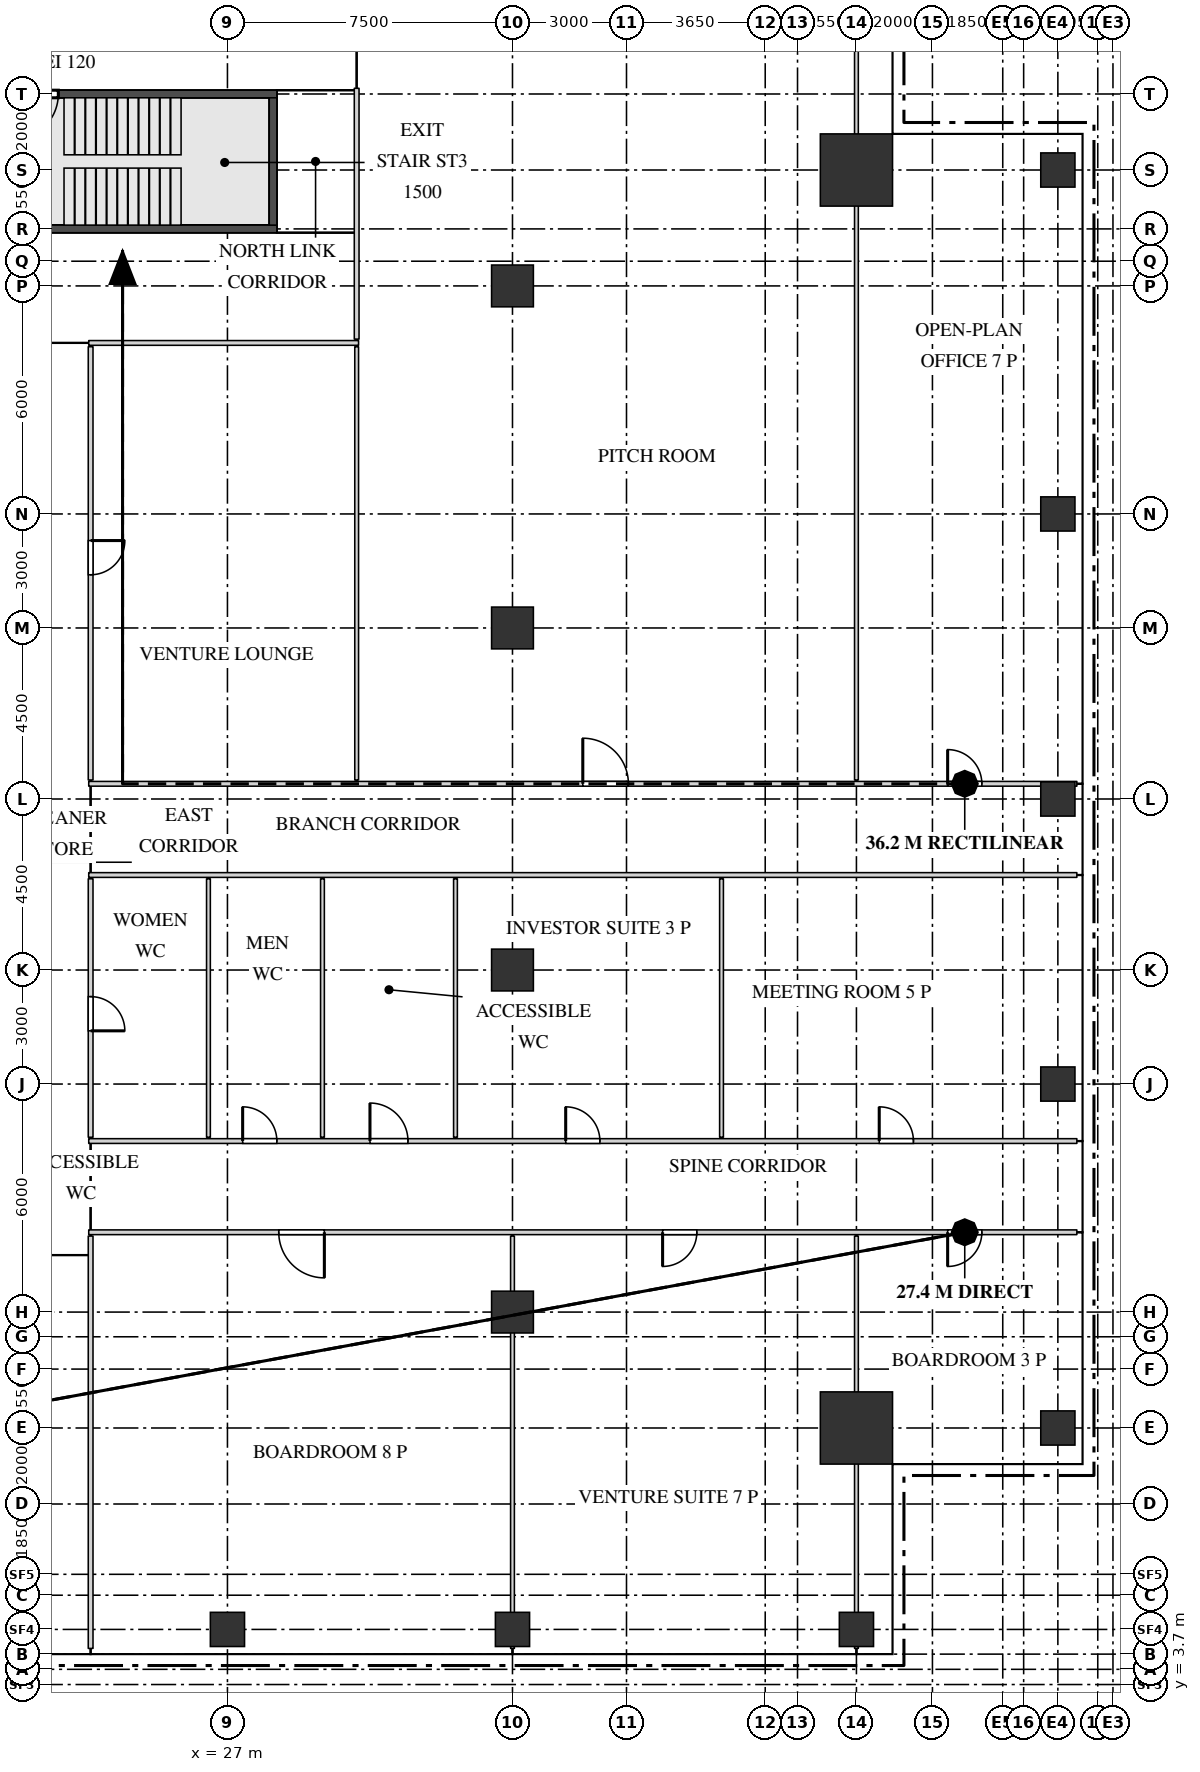
"""IFC4 building model, lengths in metres.
Left out: names, types, materials, properties, quantities, classifications, styles, units other than length and angle.
Written with IfcOpenShell. Run it as: python <this file> out.ifc"""

import sys

from ifc_helpers import new_model, si_unit, direction, frame, frame_2d, origin, origin_2d, place, context, subcontext, project, spatial, rectangle, extrude, source, transform, mapped, element, fill, save


model = new_model("IFC4")
c1 = context("Model", 3, precision=1e-05, world=origin(), true_north=direction((0.0, 1.0)))
c2 = subcontext(c1, "Body", "Model", "MODEL_VIEW")
j1 = project(units=[si_unit("LENGTHUNIT", "METRE"), si_unit("PLANEANGLEUNIT", "RADIAN")], contexts=[c1])
p1 = place(None, origin())
s1 = spatial("IfcSite", under=j1, at=p1, CompositionType="ELEMENT")
p2 = place(p1, origin())
s2 = spatial("IfcBuilding", under=s1, at=p2, CompositionType="ELEMENT")
p3 = place(p2, frame((0.0, 0.0, 234.2)))
s3 = spatial("IfcBuildingStorey", under=s2, at=p3, CompositionType="ELEMENT", Elevation=234.2)
m1 = source(origin(), c2, "Body", "SweptSolid", [
    extrude(rectangle(XDim=7.1, YDim=0.2, at=frame_2d((3.55, 0.0))), origin(), (0.0, 0.0, 1.0), 3.75),
])
p4 = place(p3, frame((21.2, 45.55, 0.0), z_axis=(0.0, 0.0, 1.0), x_axis=(1.0, 0.0, 0.0)))
e1 = element("IfcWall", 1, at=p4, inside=s3, PredefinedType="SHEAR", context=c2, shape_type="MappedRepresentation", body=[
    mapped(m1, transform((0.0, 0.0, 0.0))),
])
m2 = source(origin(), c2, "Body", "SweptSolid", [
    extrude(rectangle(XDim=1.2, YDim=2.1, at=frame_2d((0.6, 1.05))), frame((0.0, 0.11, 0.0), z_axis=(0.0, -1.0, 0.0), x_axis=(1.0, 0.0, 0.0)), (0.0, 0.0, 1.0), 0.22),
])
p5 = place(p4, frame((0.15, 0.0, 0.0)))
e2 = element("IfcOpeningElement", 2, at=p5, cuts=e1, PredefinedType="OPENING", context=c2, shape_type="MappedRepresentation", body=[
    mapped(m2, transform((0.0, 0.0, 0.0))),
])
p6 = place(p3, frame((21.2, 42.0, 0.0), z_axis=(0.0, 0.0, 1.0), x_axis=(1.0, 0.0, 0.0)))
e3 = element("IfcWall", 3, at=p6, inside=s3, PredefinedType="SHEAR", context=c2, shape_type="MappedRepresentation", body=[
    mapped(m1, transform((0.0, 0.0, 0.0))),
])
m3 = source(origin(), c2, "Body", "SweptSolid", [
    extrude(rectangle(XDim=3.35, YDim=0.2, at=frame_2d((1.675, 0.0))), origin(), (0.0, 0.0, 1.0), 3.75),
])
p7 = place(p3, frame((28.2, 42.1, 0.0), z_axis=(0.0, 0.0, 1.0), x_axis=(0.0, 1.0, 0.0)))
e4 = element("IfcWall", 4, at=p7, inside=s3, PredefinedType="SHEAR", context=c2, shape_type="MappedRepresentation", body=[
    mapped(m3, transform((0.0, 0.0, 0.0))),
])
m4 = source(origin(), c2, "Body", "SweptSolid", [
    extrude(rectangle(XDim=1.9, YDim=1.9, at=origin_2d()), origin(), (0.0, 0.0, 1.0), 4.0),
])
for number, where, z_axis, x_axis in (
    (5, (43.55, 43.55, 0.0), (0.0, 0.0, 1.0), (1.0, 0.0, 0.0)),
    (6, (43.55, 10.45, 0.0), (0.0, 0.0, 1.0), (1.0, 0.0, 0.0)),
):
    element("IfcColumn", number, at=place(p3, frame(where, z_axis=z_axis, x_axis=x_axis)), inside=s3, PredefinedType="COLUMN", context=c2, shape_type="MappedRepresentation", body=[
        mapped(m4, transform((0.0, 0.0, 0.0))),
    ])
m5 = source(origin(), c2, "Body", "SweptSolid", [
    extrude(rectangle(XDim=0.9, YDim=0.9, at=origin_2d()), origin(), (0.0, 0.0, 1.0), 3.75),
])
for number, where, z_axis, x_axis in (
    (7, (27.0, 5.15, 0.0), (0.0, 0.0, 1.0), (1.0, 0.0, 0.0)),
    (8, (34.5, 5.15, 0.0), (0.0, 0.0, 1.0), (1.0, 0.0, 0.0)),
    (9, (43.55, 5.15, 0.0), (0.0, 0.0, 1.0), (1.0, 0.0, 0.0)),
    (10, (48.85, 10.45, 0.0), (0.0, 0.0, 1.0), (1.0, 0.0, 0.0)),
    (11, (48.85, 19.5, 0.0), (0.0, 0.0, 1.0), (1.0, 0.0, 0.0)),
    (12, (48.85, 27.0, 0.0), (0.0, 0.0, 1.0), (1.0, 0.0, 0.0)),
    (13, (48.85, 34.5, 0.0), (0.0, 0.0, 1.0), (1.0, 0.0, 0.0)),
    (14, (48.85, 43.55, 0.0), (0.0, 0.0, 1.0), (1.0, 0.0, 0.0)),
):
    element("IfcColumn", number, at=place(p3, frame(where, z_axis=z_axis, x_axis=x_axis)), inside=s3, PredefinedType="COLUMN", context=c2, shape_type="MappedRepresentation", body=[
        mapped(m5, transform((0.0, 0.0, 0.0))),
    ])
m6 = source(origin(), c2, "Body", "SweptSolid", [
    extrude(rectangle(XDim=1.1, YDim=1.1, at=origin_2d()), origin(), (0.0, 0.0, 1.0), 3.75),
])
for number, where, z_axis, x_axis in (
    (15, (34.5, 13.5, 0.0), (0.0, 0.0, 1.0), (1.0, 0.0, 0.0)),
    (16, (34.5, 22.5, 0.0), (0.0, 0.0, 1.0), (1.0, 0.0, 0.0)),
    (17, (34.5, 31.5, 0.0), (0.0, 0.0, 1.0), (1.0, 0.0, 0.0)),
    (18, (34.5, 40.5, 0.0), (0.0, 0.0, 1.0), (1.0, 0.0, 0.0)),
):
    element("IfcColumn", number, at=place(p3, frame(where, z_axis=z_axis, x_axis=x_axis)), inside=s3, PredefinedType="COLUMN", context=c2, shape_type="MappedRepresentation", body=[
        mapped(m6, transform((0.0, 0.0, 0.0))),
    ])
m7 = source(origin(), c2, "Body", "SweptSolid", [
    extrude(rectangle(XDim=10.85, YDim=0.125, at=frame_2d((5.425, 0.0))), origin(), (0.0, 0.0, 1.0), 3.8),
])
p8 = place(p3, frame((23.4, 4.65, 0.0), z_axis=(0.0, 0.0, 1.0), x_axis=(0.0, 1.0, 0.0)))
e19 = element("IfcWall", 19, at=p8, inside=s3, PredefinedType="PARTITIONING", context=c2, shape_type="MappedRepresentation", body=[
    mapped(m7, transform((0.0, 0.0, 0.0))),
])
m8 = source(origin(), c2, "Body", "SweptSolid", [
    extrude(rectangle(XDim=10.85, YDim=0.1, at=frame_2d((5.425, 0.0))), origin(), (0.0, 0.0, 1.0), 3.35),
])
p9 = place(p3, frame((34.5, 4.65, 0.0), z_axis=(0.0, 0.0, 1.0), x_axis=(0.0, 1.0, 0.0)))
e20 = element("IfcWall", 20, at=p9, inside=s3, PredefinedType="PARTITIONING", context=c2, shape_type="MappedRepresentation", body=[
    mapped(m8, transform((0.0, 0.0, 0.0))),
])
m9 = source(origin(), c2, "Body", "SweptSolid", [
    extrude(rectangle(XDim=10.85, YDim=0.1, at=frame_2d((5.425, 0.0))), origin(), (0.0, 0.0, 1.0), 3.3),
])
p10 = place(p3, frame((43.55, 4.65, 0.0), z_axis=(0.0, 0.0, 1.0), x_axis=(0.0, 1.0, 0.0)))
e21 = element("IfcWall", 21, at=p10, inside=s3, PredefinedType="PARTITIONING", context=c2, shape_type="MappedRepresentation", body=[
    mapped(m9, transform((0.0, 0.0, 0.0))),
])
m10 = source(origin(), c2, "Body", "SweptSolid", [
    extrude(rectangle(XDim=26.0, YDim=0.125, at=frame_2d((13.0, 0.0))), origin(), (0.0, 0.0, 1.0), 3.8),
])
p11 = place(p3, frame((23.35, 15.6, 0.0), z_axis=(0.0, 0.0, 1.0), x_axis=(1.0, 0.0, 0.0)))
e22 = element("IfcWall", 22, at=p11, inside=s3, PredefinedType="PARTITIONING", context=c2, shape_type="MappedRepresentation", body=[
    mapped(m10, transform((0.0, 0.0, 0.0))),
])
m11 = source(origin(), c2, "Body", "SweptSolid", [
    extrude(rectangle(XDim=1.2, YDim=2.1, at=frame_2d((0.6, 1.05))), frame((0.0, 0.073, 0.0), z_axis=(0.0, -1.0, 0.0), x_axis=(1.0, 0.0, 0.0)), (0.0, 0.0, 1.0), 0.145),
])
p12 = place(p11, frame((5.0, 0.0, 0.0)))
e23 = element("IfcOpeningElement", 23, at=p12, cuts=e22, PredefinedType="OPENING", context=c2, shape_type="MappedRepresentation", body=[
    mapped(m11, transform((0.0, 0.0, 0.0))),
])
m12 = source(origin(), c2, "Body", "SweptSolid", [
    extrude(rectangle(XDim=0.9, YDim=2.1, at=frame_2d((0.45, 1.05))), frame((0.0, 0.073, 0.0), z_axis=(0.0, -1.0, 0.0), x_axis=(1.0, 0.0, 0.0)), (0.0, 0.0, 1.0), 0.145),
])
p13 = place(p11, frame((15.1, 0.0, 0.0)))
e24 = element("IfcOpeningElement", 24, at=p13, cuts=e22, PredefinedType="OPENING", context=c2, shape_type="MappedRepresentation", body=[
    mapped(m12, transform((0.0, 0.0, 0.0))),
])
p14 = place(p11, frame((22.6, 0.0, 0.0)))
e25 = element("IfcOpeningElement", 25, at=p14, cuts=e22, PredefinedType="OPENING", context=c2, shape_type="MappedRepresentation", body=[
    mapped(m12, transform((0.0, 0.0, 0.0))),
])
p15 = place(p3, frame((23.35, 18.0, 0.0), z_axis=(0.0, 0.0, 1.0), x_axis=(1.0, 0.0, 0.0)))
e26 = element("IfcWall", 26, at=p15, inside=s3, PredefinedType="PARTITIONING", context=c2, shape_type="MappedRepresentation", body=[
    mapped(m10, transform((0.0, 0.0, 0.0))),
])
p16 = place(p15, frame((4.05, 0.0, 0.0)))
e27 = element("IfcOpeningElement", 27, at=p16, cuts=e26, PredefinedType="OPENING", context=c2, shape_type="MappedRepresentation", body=[
    mapped(m12, transform((0.0, 0.0, 0.0))),
])
m13 = source(origin(), c2, "Body", "SweptSolid", [
    extrude(rectangle(XDim=1.0, YDim=2.1, at=frame_2d((0.5, 1.05))), frame((0.0, 0.073, 0.0), z_axis=(0.0, -1.0, 0.0), x_axis=(1.0, 0.0, 0.0)), (0.0, 0.0, 1.0), 0.145),
])
p17 = place(p15, frame((7.4, 0.0, 0.0)))
e28 = element("IfcOpeningElement", 28, at=p17, cuts=e26, PredefinedType="OPENING", context=c2, shape_type="MappedRepresentation", body=[
    mapped(m13, transform((0.0, 0.0, 0.0))),
])
p18 = place(p15, frame((12.55, 0.0, 0.0)))
e29 = element("IfcOpeningElement", 29, at=p18, cuts=e26, PredefinedType="OPENING", context=c2, shape_type="MappedRepresentation", body=[
    mapped(m12, transform((0.0, 0.0, 0.0))),
])
p19 = place(p15, frame((20.8, 0.0, 0.0)))
e30 = element("IfcOpeningElement", 30, at=p19, cuts=e26, PredefinedType="OPENING", context=c2, shape_type="MappedRepresentation", body=[
    mapped(m12, transform((0.0, 0.0, 0.0))),
])
m14 = source(origin(), c2, "Body", "SweptSolid", [
    extrude(rectangle(XDim=6.8, YDim=0.125, at=frame_2d((3.4, 0.0))), origin(), (0.0, 0.0, 1.0), 3.8),
])
p20 = place(p3, frame((23.4, 18.1, 0.0), z_axis=(0.0, 0.0, 1.0), x_axis=(0.0, 1.0, 0.0)))
e31 = element("IfcWall", 31, at=p20, inside=s3, PredefinedType="PARTITIONING", context=c2, shape_type="MappedRepresentation", body=[
    mapped(m14, transform((0.0, 0.0, 0.0))),
])
p21 = place(p20, frame((2.8, 0.0, 0.0)))
e32 = element("IfcOpeningElement", 32, at=p21, cuts=e31, PredefinedType="OPENING", context=c2, shape_type="MappedRepresentation", body=[
    mapped(m12, transform((0.0, 0.0, 0.0))),
])
m15 = source(origin(), c2, "Body", "SweptSolid", [
    extrude(rectangle(XDim=6.8, YDim=0.1, at=frame_2d((3.4, 0.0))), origin(), (0.0, 0.0, 1.0), 3.8),
])
for number, where, z_axis, x_axis in (
    (33, (26.5, 18.1, 0.0), (0.0, 0.0, 1.0), (0.0, 1.0, 0.0)),
    (34, (29.5, 18.1, 0.0), (0.0, 0.0, 1.0), (0.0, 1.0, 0.0)),
    (35, (33.0, 18.1, 0.0), (0.0, 0.0, 1.0), (0.0, 1.0, 0.0)),
    (36, (40.0, 18.1, 0.0), (0.0, 0.0, 1.0), (0.0, 1.0, 0.0)),
):
    element("IfcWall", number, at=place(p3, frame(where, z_axis=z_axis, x_axis=x_axis)), inside=s3, PredefinedType="PARTITIONING", context=c2, shape_type="MappedRepresentation", body=[
        mapped(m15, transform((0.0, 0.0, 0.0))),
    ])
p22 = place(p3, frame((23.35, 25.0, 0.0), z_axis=(0.0, 0.0, 1.0), x_axis=(1.0, 0.0, 0.0)))
e37 = element("IfcWall", 37, at=p22, inside=s3, PredefinedType="PARTITIONING", context=c2, shape_type="MappedRepresentation", body=[
    mapped(m10, transform((0.0, 0.0, 0.0))),
])
p23 = place(p3, frame((23.35, 27.4, 0.0), z_axis=(0.0, 0.0, 1.0), x_axis=(1.0, 0.0, 0.0)))
e38 = element("IfcWall", 38, at=p23, inside=s3, PredefinedType="PARTITIONING", context=c2, shape_type="MappedRepresentation", body=[
    mapped(m10, transform((0.0, 0.0, 0.0))),
])
p24 = place(p23, frame((13.0, 0.0, 0.0)))
e39 = element("IfcOpeningElement", 39, at=p24, cuts=e38, PredefinedType="OPENING", context=c2, shape_type="MappedRepresentation", body=[
    mapped(m11, transform((0.0, 0.0, 0.0))),
])
p25 = place(p23, frame((22.6, 0.0, 0.0)))
e40 = element("IfcOpeningElement", 40, at=p25, cuts=e38, PredefinedType="OPENING", context=c2, shape_type="MappedRepresentation", body=[
    mapped(m12, transform((0.0, 0.0, 0.0))),
])
m16 = source(origin(), c2, "Body", "SweptSolid", [
    extrude(rectangle(XDim=11.4, YDim=0.125, at=frame_2d((5.7, 0.0))), origin(), (0.0, 0.0, 1.0), 3.8),
])
p26 = place(p3, frame((23.4, 27.5, 0.0), z_axis=(0.0, 0.0, 1.0), x_axis=(0.0, 1.0, 0.0)))
e41 = element("IfcWall", 41, at=p26, inside=s3, PredefinedType="PARTITIONING", context=c2, shape_type="MappedRepresentation", body=[
    mapped(m16, transform((0.0, 0.0, 0.0))),
])
p27 = place(p26, frame((5.4, 0.0, 0.0)))
e42 = element("IfcOpeningElement", 42, at=p27, cuts=e41, PredefinedType="OPENING", context=c2, shape_type="MappedRepresentation", body=[
    mapped(m12, transform((0.0, 0.0, 0.0))),
])
m17 = source(origin(), c2, "Body", "SweptSolid", [
    extrude(rectangle(XDim=11.4, YDim=0.1, at=frame_2d((5.7, 0.0))), origin(), (0.0, 0.0, 1.0), 3.8),
])
p28 = place(p3, frame((30.4, 27.5, 0.0), z_axis=(0.0, 0.0, 1.0), x_axis=(0.0, 1.0, 0.0)))
e43 = element("IfcWall", 43, at=p28, inside=s3, PredefinedType="PARTITIONING", context=c2, shape_type="MappedRepresentation", body=[
    mapped(m17, transform((0.0, 0.0, 0.0))),
])
m18 = source(origin(), c2, "Body", "SweptSolid", [
    extrude(rectangle(XDim=21.85, YDim=0.1, at=frame_2d((10.925, 0.0))), origin(), (0.0, 0.0, 1.0), 3.3),
])
p29 = place(p3, frame((43.55, 27.5, 0.0), z_axis=(0.0, 0.0, 1.0), x_axis=(0.0, 1.0, 0.0)))
e44 = element("IfcWall", 44, at=p29, inside=s3, PredefinedType="PARTITIONING", context=c2, shape_type="MappedRepresentation", body=[
    mapped(m18, transform((0.0, 0.0, 0.0))),
])
m19 = source(origin(), c2, "Body", "SweptSolid", [
    extrude(rectangle(XDim=7.1, YDim=0.125, at=frame_2d((3.55, 0.0))), origin(), (0.0, 0.0, 1.0), 3.8),
])
p30 = place(p3, frame((23.35, 39.0, 0.0), z_axis=(0.0, 0.0, 1.0), x_axis=(1.0, 0.0, 0.0)))
e45 = element("IfcWall", 45, at=p30, inside=s3, PredefinedType="PARTITIONING", context=c2, shape_type="MappedRepresentation", body=[
    mapped(m19, transform((0.0, 0.0, 0.0))),
])
m20 = source(origin(), c2, "Body", "SweptSolid", [
    extrude(rectangle(XDim=6.6, YDim=0.125, at=frame_2d((3.3, 0.0))), origin(), (0.0, 0.0, 1.0), 3.8),
])
p31 = place(p3, frame((30.4, 39.1, 0.0), z_axis=(0.0, 0.0, 1.0), x_axis=(0.0, 1.0, 0.0)))
e46 = element("IfcWall", 46, at=p31, inside=s3, PredefinedType="PARTITIONING", context=c2, shape_type="MappedRepresentation", body=[
    mapped(m20, transform((0.0, 0.0, 0.0))),
])
m21 = source(origin(), c2, "Body", "SweptSolid", [
    extrude(rectangle(XDim=1.2, YDim=2.1, at=frame_2d((0.6, 1.05))), frame((0.0, 0.025, 0.0), z_axis=(0.0, -1.0, 0.0), x_axis=(1.0, 0.0, 0.0)), (0.0, 0.0, 1.0), 0.05),
])
p32 = place(p12, origin())
e47 = element("IfcDoor", 47, at=p32, inside=s3, OperationType="SINGLE_SWING_RIGHT", PredefinedType="DOOR", context=c2, shape_type="MappedRepresentation", body=[
    mapped(m21, transform((0.0, 0.0, 0.0))),
])
fill(e23, e47)
m22 = source(origin(), c2, "Body", "SweptSolid", [
    extrude(rectangle(XDim=0.9, YDim=2.1, at=frame_2d((0.45, 1.05))), frame((0.0, 0.025, 0.0), z_axis=(0.0, -1.0, 0.0), x_axis=(1.0, 0.0, 0.0)), (0.0, 0.0, 1.0), 0.05),
])
p33 = place(p13, origin())
e48 = element("IfcDoor", 48, at=p33, inside=s3, OperationType="SINGLE_SWING_LEFT", PredefinedType="DOOR", context=c2, shape_type="MappedRepresentation", body=[
    mapped(m22, transform((0.0, 0.0, 0.0))),
])
fill(e24, e48)
p34 = place(p14, origin())
e49 = element("IfcDoor", 49, at=p34, inside=s3, OperationType="SINGLE_SWING_LEFT", PredefinedType="DOOR", context=c2, shape_type="MappedRepresentation", body=[
    mapped(m22, transform((0.0, 0.0, 0.0))),
])
fill(e25, e49)
p35 = place(p21, origin())
e50 = element("IfcDoor", 50, at=p35, inside=s3, OperationType="SINGLE_SWING_LEFT", PredefinedType="DOOR", context=c2, shape_type="MappedRepresentation", body=[
    mapped(m22, transform((0.0, 0.0, 0.0))),
])
fill(e32, e50)
p36 = place(p16, origin())
e51 = element("IfcDoor", 51, at=p36, inside=s3, OperationType="SINGLE_SWING_RIGHT", PredefinedType="DOOR", context=c2, shape_type="MappedRepresentation", body=[
    mapped(m22, transform((0.0, 0.0, 0.0))),
])
fill(e27, e51)
m23 = source(origin(), c2, "Body", "SweptSolid", [
    extrude(rectangle(XDim=1.0, YDim=2.1, at=frame_2d((0.5, 1.05))), frame((0.0, 0.025, 0.0), z_axis=(0.0, -1.0, 0.0), x_axis=(1.0, 0.0, 0.0)), (0.0, 0.0, 1.0), 0.05),
])
p37 = place(p17, origin())
e52 = element("IfcDoor", 52, at=p37, inside=s3, OperationType="SINGLE_SWING_RIGHT", PredefinedType="DOOR", context=c2, shape_type="MappedRepresentation", body=[
    mapped(m23, transform((0.0, 0.0, 0.0))),
])
fill(e28, e52)
p38 = place(p18, origin())
e53 = element("IfcDoor", 53, at=p38, inside=s3, OperationType="SINGLE_SWING_RIGHT", PredefinedType="DOOR", context=c2, shape_type="MappedRepresentation", body=[
    mapped(m22, transform((0.0, 0.0, 0.0))),
])
fill(e29, e53)
p39 = place(p19, origin())
e54 = element("IfcDoor", 54, at=p39, inside=s3, OperationType="SINGLE_SWING_RIGHT", PredefinedType="DOOR", context=c2, shape_type="MappedRepresentation", body=[
    mapped(m22, transform((0.0, 0.0, 0.0))),
])
fill(e30, e54)
p40 = place(p27, origin())
e55 = element("IfcDoor", 55, at=p40, inside=s3, OperationType="SINGLE_SWING_RIGHT", PredefinedType="DOOR", context=c2, shape_type="MappedRepresentation", body=[
    mapped(m22, transform((0.0, 0.0, 0.0))),
])
fill(e42, e55)
p41 = place(p24, origin())
e56 = element("IfcDoor", 56, at=p41, inside=s3, OperationType="SINGLE_SWING_RIGHT", PredefinedType="DOOR", context=c2, shape_type="MappedRepresentation", body=[
    mapped(m21, transform((0.0, 0.0, 0.0))),
])
fill(e39, e56)
p42 = place(p25, origin())
e57 = element("IfcDoor", 57, at=p42, inside=s3, OperationType="SINGLE_SWING_RIGHT", PredefinedType="DOOR", context=c2, shape_type="MappedRepresentation", body=[
    mapped(m22, transform((0.0, 0.0, 0.0))),
])
fill(e40, e57)
p43 = place(p5, origin())
e58 = element("IfcDoor", 58, at=p43, inside=s3, OperationType="SINGLE_SWING_LEFT", PredefinedType="DOOR", context=c2, shape_type="MappedRepresentation", body=[
    mapped(m21, transform((0.0, 0.0, 0.0))),
])
fill(e2, e58)
save(model, sys.argv[1])
